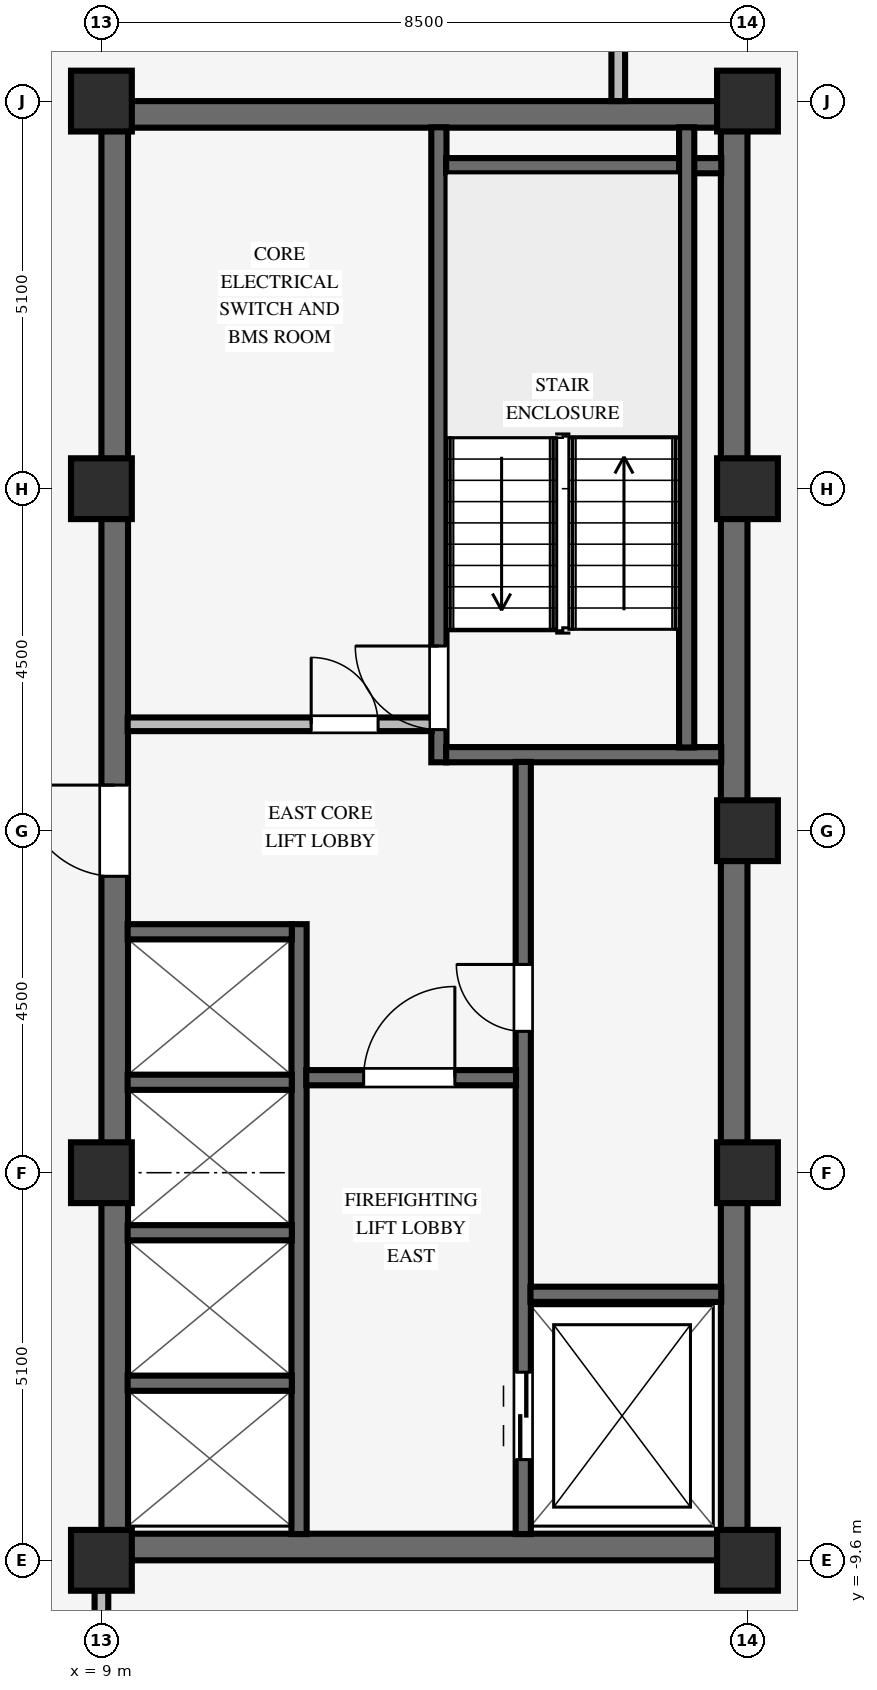
"""IFC4 building model, lengths in metres.
Left out: names, types, materials, properties, quantities, classifications, styles, units other than length and angle.
Written with IfcOpenShell. Run it as: python <this file> out.ifc"""

import sys

from ifc_helpers import new_model, si_unit, direction, frame, frame_2d, origin, origin_2d, place, context, subcontext, project, spatial, rectangle, extrude, source, transform, mapped, element, fill, save


model = new_model("IFC4")
c1 = context("Model", 3, precision=1e-05, world=origin(), true_north=direction((0.0, 1.0)))
c2 = subcontext(c1, "Body", "Model", "MODEL_VIEW")
j1 = project(units=[si_unit("LENGTHUNIT", "METRE"), si_unit("PLANEANGLEUNIT", "RADIAN")], contexts=[c1])
p1 = place(None, origin())
s1 = spatial("IfcSite", under=j1, at=p1, CompositionType="ELEMENT")
p2 = place(p1, origin())
s2 = spatial("IfcBuilding", under=s1, at=p2, CompositionType="ELEMENT")
p3 = place(p2, frame((0.0, 0.0, 227.4)))
s3 = spatial("IfcBuildingStorey", under=s2, at=p3, CompositionType="ELEMENT", Elevation=227.4)
for number, where, z_axis, x_axis in (
    (1, (9.0, -9.425, 0.0), (0.0, 0.0, 1.0), (1.0, 0.0, 0.0)),
    (2, (9.0, 9.425, 0.0), (0.0, 0.0, 1.0), (1.0, 0.0, 0.0)),
):
    element("IfcWall", number, at=place(p3, frame(where, z_axis=z_axis, x_axis=x_axis)), inside=s3, PredefinedType="SHEAR", context=c2, shape_type="SweptSolid", body=[
        extrude(rectangle(XDim=8.5, YDim=0.35, at=frame_2d((4.25, 0.0))), origin(), (0.0, 0.0, 1.0), 3.37),
    ])
p4 = place(p3, frame((9.175, -9.255, 0.0), z_axis=(0.0, 0.0, 1.0), x_axis=(0.0, 1.0, 0.0)))
e3 = element("IfcWall", 3, at=p4, inside=s3, PredefinedType="SHEAR", context=c2, shape_type="SweptSolid", body=[
    extrude(rectangle(XDim=18.51, YDim=0.35, at=frame_2d((9.255, 0.0))), origin(), (0.0, 0.0, 1.0), 3.37),
])
p5 = place(p4, frame((8.655, 0.0, 0.0)))
e4 = element("IfcOpeningElement", 4, at=p5, cuts=e3, PredefinedType="OPENING", context=c2, shape_type="SweptSolid", body=[
    extrude(rectangle(XDim=1.2, YDim=2.15, at=frame_2d((0.6, 1.075))), frame((0.0, 0.185, 0.0), z_axis=(0.0, -1.0, 0.0), x_axis=(1.0, 0.0, 0.0)), (0.0, 0.0, 1.0), 0.37),
])
p6 = place(p3, frame((17.325, -9.255, 0.0), z_axis=(0.0, 0.0, 1.0), x_axis=(0.0, 1.0, 0.0)))
e5 = element("IfcWall", 5, at=p6, inside=s3, PredefinedType="SHEAR", context=c2, shape_type="SweptSolid", body=[
    extrude(rectangle(XDim=18.51, YDim=0.35, at=frame_2d((9.255, 0.0))), origin(), (0.0, 0.0, 1.0), 3.37),
])
for number, where, z_axis, x_axis in (
    (6, (9.0, -9.6, 0.0), (0.0, 0.0, 1.0), (1.0, 0.0, 0.0)),
    (7, (9.0, -4.5, 0.0), (0.0, 0.0, 1.0), (1.0, 0.0, 0.0)),
    (8, (9.0, 4.5, 0.0), (0.0, 0.0, 1.0), (1.0, 0.0, 0.0)),
    (9, (9.0, 9.6, 0.0), (0.0, 0.0, 1.0), (1.0, 0.0, 0.0)),
    (10, (17.5, -9.6, 0.0), (0.0, 0.0, 1.0), (1.0, 0.0, 0.0)),
    (11, (17.5, -4.5, 0.0), (0.0, 0.0, 1.0), (1.0, 0.0, 0.0)),
    (12, (17.5, 4.5, 0.0), (0.0, 0.0, 1.0), (1.0, 0.0, 0.0)),
    (13, (17.5, 9.6, 0.0), (0.0, 0.0, 1.0), (1.0, 0.0, 0.0)),
    (14, (17.5, 0.0, 0.0), (0.0, 0.0, 1.0), (1.0, 0.0, 0.0)),
):
    element("IfcColumn", number, at=place(p3, frame(where, z_axis=z_axis, x_axis=x_axis)), inside=s3, PredefinedType="COLUMN", context=c2, shape_type="SweptSolid", body=[
        extrude(rectangle(XDim=0.8, YDim=0.8, at=origin_2d()), origin(), (0.0, 0.0, 1.0), 3.37),
    ])
p7 = place(p3, frame((13.44, 0.9, 0.0), z_axis=(0.0, 0.0, 1.0), x_axis=(0.0, 1.0, 0.0)))
e15 = element("IfcWall", 15, at=p7, inside=s3, PredefinedType="SHEAR", context=c2, shape_type="SweptSolid", body=[
    extrude(rectangle(XDim=8.355, YDim=0.2, at=frame_2d((4.177, 0.0))), origin(), (0.0, 0.0, 1.0), 3.37),
])
p8 = place(p7, frame((0.43, 0.0, 0.0)))
e16 = element("IfcOpeningElement", 16, at=p8, cuts=e15, PredefinedType="OPENING", context=c2, shape_type="SweptSolid", body=[
    extrude(rectangle(XDim=1.1, YDim=2.15, at=frame_2d((0.55, 1.075))), frame((0.0, 0.11, 0.0), z_axis=(0.0, -1.0, 0.0), x_axis=(1.0, 0.0, 0.0)), (0.0, 0.0, 1.0), 0.22),
])
for number, where, z_axis, x_axis in (
    (17, (13.535, 1.0, 0.0), (0.0, 0.0, 1.0), (1.0, 0.0, 0.0)),
    (18, (13.535, 8.75, 0.0), (0.0, 0.0, 1.0), (1.0, 0.0, 0.0)),
):
    element("IfcWall", number, at=place(p3, frame(where, z_axis=z_axis, x_axis=x_axis)), inside=s3, PredefinedType="SHEAR", context=c2, shape_type="SweptSolid", body=[
        extrude(rectangle(XDim=3.62, YDim=0.2, at=frame_2d((1.81, 0.0))), origin(), (0.0, 0.0, 1.0), 3.37),
    ])
p9 = place(p3, frame((16.7, 1.095, 0.0), z_axis=(0.0, 0.0, 1.0), x_axis=(0.0, 1.0, 0.0)))
e19 = element("IfcWall", 19, at=p9, inside=s3, PredefinedType="SHEAR", context=c2, shape_type="SweptSolid", body=[
    extrude(rectangle(XDim=8.16, YDim=0.2, at=frame_2d((4.08, 0.0))), origin(), (0.0, 0.0, 1.0), 3.37),
])
p10 = place(p3, frame((14.55, -9.255, 0.0), z_axis=(0.0, 0.0, 1.0), x_axis=(0.0, 1.0, 0.0)))
e20 = element("IfcWall", 20, at=p10, inside=s3, PredefinedType="SHEAR", context=c2, shape_type="SweptSolid", body=[
    extrude(rectangle(XDim=10.16, YDim=0.2, at=frame_2d((5.08, 0.0))), origin(), (0.0, 0.0, 1.0), 3.37),
])
p11 = place(p10, frame((6.615, 0.0, 0.0)))
e21 = element("IfcOpeningElement", 21, at=p11, cuts=e20, PredefinedType="OPENING", context=c2, shape_type="SweptSolid", body=[
    extrude(rectangle(XDim=0.88, YDim=2.1, at=frame_2d((0.44, 1.05))), frame((0.0, 0.11, 0.0), z_axis=(0.0, -1.0, 0.0), x_axis=(1.0, 0.0, 0.0)), (0.0, 0.0, 1.0), 0.22),
])
p12 = place(p10, frame((0.98, 0.0, 0.0)))
e22 = element("IfcOpeningElement", 22, at=p12, cuts=e20, PredefinedType="OPENING", context=c2, shape_type="SweptSolid", body=[
    extrude(rectangle(XDim=1.15, YDim=2.15, at=frame_2d((0.575, 1.075))), frame((0.0, 0.11, 0.0), z_axis=(0.0, -1.0, 0.0), x_axis=(1.0, 0.0, 0.0)), (0.0, 0.0, 1.0), 0.22),
])
p13 = place(p3, frame((14.645, -6.1, 0.0), z_axis=(0.0, 0.0, 1.0), x_axis=(1.0, 0.0, 0.0)))
e23 = element("IfcWall", 23, at=p13, inside=s3, PredefinedType="SHEAR", context=c2, shape_type="SweptSolid", body=[
    extrude(rectangle(XDim=2.51, YDim=0.2, at=frame_2d((1.255, 0.0))), origin(), (0.0, 0.0, 1.0), 3.37),
])
p14 = place(p3, frame((11.6, -9.255, 0.0), z_axis=(0.0, 0.0, 1.0), x_axis=(0.0, 1.0, 0.0)))
e24 = element("IfcWall", 24, at=p14, inside=s3, PredefinedType="SHEAR", context=c2, shape_type="SweptSolid", body=[
    extrude(rectangle(XDim=8.025, YDim=0.2, at=frame_2d((4.012, 0.0))), origin(), (0.0, 0.0, 1.0), 3.37),
])
p15 = place(p3, frame((11.695, -3.25, 0.0), z_axis=(0.0, 0.0, 1.0), x_axis=(1.0, 0.0, 0.0)))
e25 = element("IfcWall", 25, at=p15, inside=s3, PredefinedType="SHEAR", context=c2, shape_type="SweptSolid", body=[
    extrude(rectangle(XDim=2.76, YDim=0.2, at=frame_2d((1.38, 0.0))), origin(), (0.0, 0.0, 1.0), 3.37),
])
p16 = place(p15, frame((0.755, 0.0, 0.0)))
e26 = element("IfcOpeningElement", 26, at=p16, cuts=e25, PredefinedType="OPENING", context=c2, shape_type="SweptSolid", body=[
    extrude(rectangle(XDim=1.2, YDim=2.15, at=frame_2d((0.6, 1.075))), frame((0.0, 0.11, 0.0), z_axis=(0.0, -1.0, 0.0), x_axis=(1.0, 0.0, 0.0)), (0.0, 0.0, 1.0), 0.22),
])
for number, where, z_axis, x_axis in (
    (27, (9.345, -7.27, 0.0), (0.0, 0.0, 1.0), (1.0, 0.0, 0.0)),
    (28, (9.345, -5.29, 0.0), (0.0, 0.0, 1.0), (1.0, 0.0, 0.0)),
    (29, (9.345, -3.31, 0.0), (0.0, 0.0, 1.0), (1.0, 0.0, 0.0)),
    (30, (9.345, -1.33, 0.0), (0.0, 0.0, 1.0), (1.0, 0.0, 0.0)),
):
    element("IfcWall", number, at=place(p3, frame(where, z_axis=z_axis, x_axis=x_axis)), inside=s3, PredefinedType="SHEAR", context=c2, shape_type="SweptSolid", body=[
        extrude(rectangle(XDim=2.16, YDim=0.2, at=frame_2d((1.08, 0.0))), origin(), (0.0, 0.0, 1.0), 3.37),
    ])
p17 = place(p3, frame((9.345, 1.4, 0.0), z_axis=(0.0, 0.0, 1.0), x_axis=(1.0, 0.0, 0.0)))
e31 = element("IfcWall", 31, at=p17, inside=s3, PredefinedType="PARTITIONING", context=c2, shape_type="SweptSolid", body=[
    extrude(rectangle(XDim=4.0, YDim=0.18, at=frame_2d((2.0, 0.0))), origin(), (0.0, 0.0, 1.0), 3.36),
])
p18 = place(p17, frame((2.415, 0.0, 0.0)))
e32 = element("IfcOpeningElement", 32, at=p18, cuts=e31, PredefinedType="OPENING", context=c2, shape_type="SweptSolid", body=[
    extrude(rectangle(XDim=0.88, YDim=2.1, at=frame_2d((0.44, 1.05))), frame((0.0, 0.1, 0.0), z_axis=(0.0, -1.0, 0.0), x_axis=(1.0, 0.0, 0.0)), (0.0, 0.0, 1.0), 0.2),
])
p19 = place(p3, frame((9.0, -15.314, 0.0), z_axis=(0.0, 0.0, 1.0), x_axis=(0.0, 1.0, 0.0)))
e33 = element("IfcWall", 33, at=p19, inside=s3, PredefinedType="PARTITIONING", context=c2, shape_type="SweptSolid", body=[
    extrude(rectangle(XDim=5.318, YDim=0.18, at=frame_2d((2.659, 0.0))), origin(), (0.0, 0.0, 1.0), 2.892),
])
p20 = place(p19, frame((2.179, 0.0, 0.0)))
e34 = element("IfcOpeningElement", 34, at=p20, cuts=e33, PredefinedType="OPENING", context=c2, shape_type="SweptSolid", body=[
    extrude(rectangle(XDim=0.96, YDim=2.1, at=frame_2d((0.48, 1.05))), frame((0.0, 0.1, 0.0), z_axis=(0.0, -1.0, 0.0), x_axis=(1.0, 0.0, 0.0)), (0.0, 0.0, 1.0), 0.2),
])
p21 = place(p3, frame((15.8, 9.6, 0.0), z_axis=(0.0, 0.0, 1.0), x_axis=(0.0, 1.0, 0.0)))
e35 = element("IfcWall", 35, at=p21, inside=s3, PredefinedType="PARTITIONING", context=c2, shape_type="SweptSolid", body=[
    extrude(rectangle(XDim=2.514, YDim=0.18, at=frame_2d((1.257, 0.0))), origin(), (0.0, 0.0, 1.0), 3.36),
])
m1 = source(origin(), c2, "Body", "SweptSolid", [
    extrude(rectangle(XDim=1.1, YDim=2.15, at=frame_2d((0.55, 1.075))), frame((0.0, 0.025, 0.0), z_axis=(0.0, -1.0, 0.0), x_axis=(1.0, 0.0, 0.0)), (0.0, 0.0, 1.0), 0.05),
])
p22 = place(p8, origin())
e36 = element("IfcDoor", 36, at=p22, inside=s3, OperationType="SINGLE_SWING_RIGHT", PredefinedType="DOOR", context=c2, shape_type="MappedRepresentation", body=[
    mapped(m1, transform((0.0, 0.0, 0.0), scale=1.0)),
])
fill(e16, e36)
m2 = source(origin(), c2, "Body", "SweptSolid", [
    extrude(rectangle(XDim=0.88, YDim=2.1, at=frame_2d((0.44, 1.05))), frame((0.0, 0.025, 0.0), z_axis=(0.0, -1.0, 0.0), x_axis=(1.0, 0.0, 0.0)), (0.0, 0.0, 1.0), 0.05),
])
p23 = place(p11, origin())
e37 = element("IfcDoor", 37, at=p23, inside=s3, OperationType="SINGLE_SWING_RIGHT", PredefinedType="DOOR", context=c2, shape_type="MappedRepresentation", body=[
    mapped(m2, transform((0.0, 0.0, 0.0), scale=1.0)),
])
fill(e21, e37)
m3 = source(origin(), c2, "Body", "SweptSolid", [
    extrude(rectangle(XDim=1.2, YDim=2.15, at=frame_2d((0.6, 1.075))), frame((0.0, 0.025, 0.0), z_axis=(0.0, -1.0, 0.0), x_axis=(1.0, 0.0, 0.0)), (0.0, 0.0, 1.0), 0.05),
])
p24 = place(p16, origin())
e38 = element("IfcDoor", 38, at=p24, inside=s3, OperationType="SINGLE_SWING_RIGHT", PredefinedType="DOOR", context=c2, shape_type="MappedRepresentation", body=[
    mapped(m3, transform((0.0, 0.0, 0.0), scale=1.0)),
])
fill(e26, e38)
p25 = place(p5, origin())
e39 = element("IfcDoor", 39, at=p25, inside=s3, OperationType="SINGLE_SWING_RIGHT", PredefinedType="DOOR", context=c2, shape_type="MappedRepresentation", body=[
    mapped(m3, transform((0.0, 0.0, 0.0), scale=1.0)),
])
fill(e4, e39)
p26 = place(p18, origin())
e40 = element("IfcDoor", 40, at=p26, inside=s3, OperationType="SINGLE_SWING_LEFT", PredefinedType="DOOR", context=c2, shape_type="MappedRepresentation", body=[
    mapped(m2, transform((0.0, 0.0, 0.0), scale=1.0)),
])
fill(e32, e40)
m4 = source(origin(), c2, "Body", "SweptSolid", [
    extrude(rectangle(XDim=1.15, YDim=2.15, at=frame_2d((0.575, 1.075))), frame((0.0, 0.025, 0.0), z_axis=(0.0, -1.0, 0.0), x_axis=(1.0, 0.0, 0.0)), (0.0, 0.0, 1.0), 0.05),
])
p27 = place(p12, origin())
e41 = element("IfcDoor", 41, at=p27, inside=s3, OperationType="DOUBLE_DOOR_SLIDING", PredefinedType="DOOR", context=c2, shape_type="MappedRepresentation", body=[
    mapped(m4, transform((0.0, 0.0, 0.0), scale=1.0)),
])
fill(e22, e41)
save(model, sys.argv[1])
